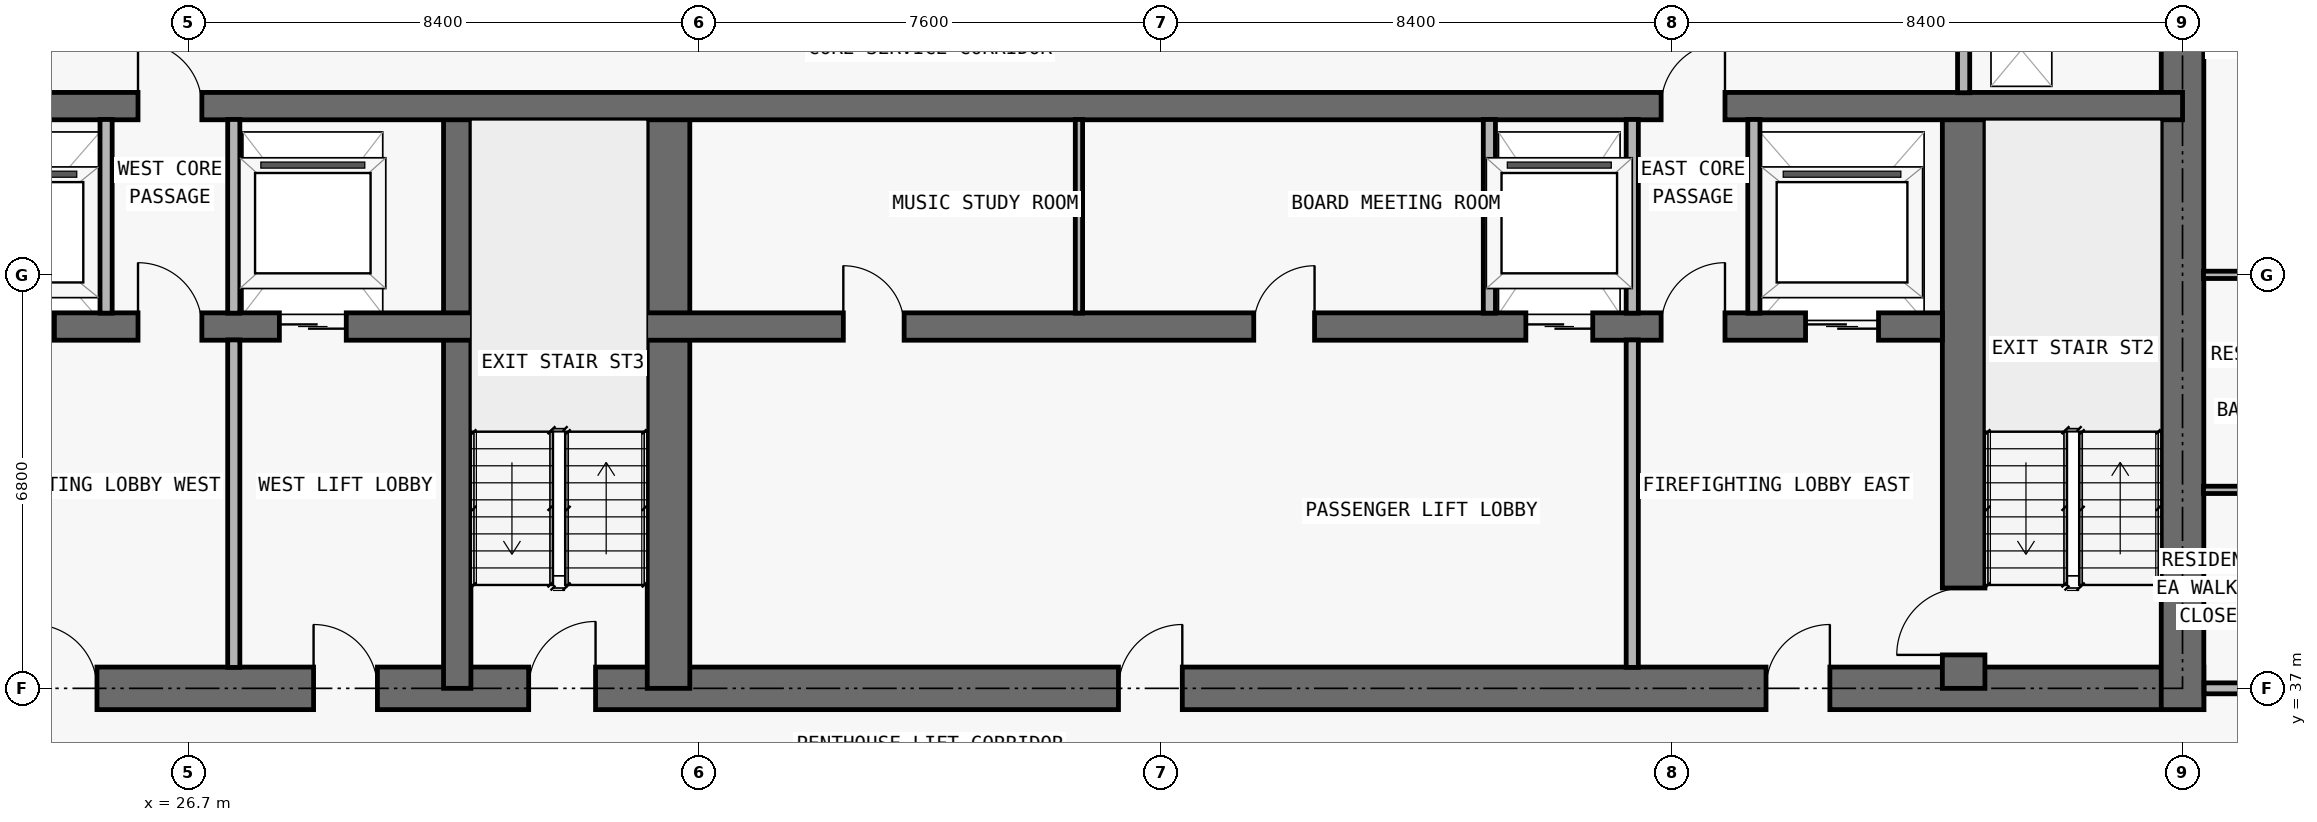
"""IFC4 building model, lengths in metres.
Left out: names, types, materials, properties, quantities, classifications, styles, units other than length and angle.
Written with IfcOpenShell. Run it as: python <this file> out.ifc"""

import sys

from ifc_helpers import new_model, si_unit, direction, frame, frame_2d, origin, place, context, subcontext, project, spatial, rectangle, extrude, element, fill, save


model = new_model("IFC4")
c1 = context("Model", 3, precision=1e-05, world=origin(), true_north=direction((0.0, 1.0)))
c2 = subcontext(c1, "Body", "Model", "MODEL_VIEW")
j1 = project(units=[si_unit("LENGTHUNIT", "METRE"), si_unit("PLANEANGLEUNIT", "RADIAN")], contexts=[c1])
p1 = place(None, origin())
s1 = spatial("IfcSite", under=j1, at=p1, CompositionType="ELEMENT")
p2 = place(p1, origin())
s2 = spatial("IfcBuilding", under=s1, at=p2, CompositionType="ELEMENT")
p3 = place(p2, frame((0.0, 0.0, 229.8)))
s3 = spatial("IfcBuildingStorey", under=s2, at=p3, CompositionType="ELEMENT", Elevation=229.8)
p4 = place(p3, frame((17.95, 37.0, 0.0), z_axis=(0.0, 0.0, 1.0), x_axis=(1.0, 0.0, 0.0)))
e1 = element("IfcWall", 1, at=p4, inside=s3, PredefinedType="SHEAR", context=c2, shape_type="SweptSolid", body=[
    extrude(rectangle(XDim=41.9, YDim=0.7, at=frame_2d((20.95, 0.0))), origin(), (0.0, 0.0, 1.0), 3.05),
])
p5 = place(p4, frame((14.35, 0.0, 0.0)))
e2 = element("IfcOpeningElement", 2, at=p5, cuts=e1, PredefinedType="OPENING", context=c2, shape_type="SweptSolid", body=[
    extrude(rectangle(XDim=1.1, YDim=2.15, at=frame_2d((0.55, 1.075))), frame((0.0, 0.36, 0.0), z_axis=(0.0, -1.0, 0.0), x_axis=(1.0, 0.0, 0.0)), (0.0, 0.0, 1.0), 0.72),
])
p6 = place(p4, frame((6.2, 0.0, 0.0)))
e3 = element("IfcOpeningElement", 3, at=p6, cuts=e1, PredefinedType="OPENING", context=c2, shape_type="SweptSolid", body=[
    extrude(rectangle(XDim=1.05, YDim=2.15, at=frame_2d((0.525, 1.075))), frame((0.0, 0.36, 0.0), z_axis=(0.0, -1.0, 0.0), x_axis=(1.0, 0.0, 0.0)), (0.0, 0.0, 1.0), 0.72),
])
p7 = place(p4, frame((34.7, 0.0, 0.0)))
e4 = element("IfcOpeningElement", 4, at=p7, cuts=e1, PredefinedType="OPENING", context=c2, shape_type="SweptSolid", body=[
    extrude(rectangle(XDim=1.05, YDim=2.15, at=frame_2d((0.525, 1.075))), frame((0.0, 0.36, 0.0), z_axis=(0.0, -1.0, 0.0), x_axis=(1.0, 0.0, 0.0)), (0.0, 0.0, 1.0), 0.72),
])
p8 = place(p4, frame((10.812, 0.0, 0.0)))
e5 = element("IfcOpeningElement", 5, at=p8, cuts=e1, PredefinedType="OPENING", context=c2, shape_type="SweptSolid", body=[
    extrude(rectangle(XDim=1.05, YDim=2.15, at=frame_2d((0.525, 1.075))), frame((0.0, 0.36, 0.0), z_axis=(0.0, -1.0, 0.0), x_axis=(1.0, 0.0, 0.0)), (0.0, 0.0, 1.0), 0.72),
])
p9 = place(p4, frame((24.05, 0.0, 0.0)))
e6 = element("IfcOpeningElement", 6, at=p9, cuts=e1, PredefinedType="OPENING", context=c2, shape_type="SweptSolid", body=[
    extrude(rectangle(XDim=1.05, YDim=2.15, at=frame_2d((0.525, 1.075))), frame((0.0, 0.36, 0.0), z_axis=(0.0, -1.0, 0.0), x_axis=(1.0, 0.0, 0.0)), (0.0, 0.0, 1.0), 0.72),
])
p10 = place(p3, frame((59.5, 36.65, 0.0), z_axis=(0.0, 0.0, 1.0), x_axis=(0.0, 1.0, 0.0)))
e7 = element("IfcWall", 7, at=p10, inside=s3, PredefinedType="SHEAR", context=c2, shape_type="SweptSolid", body=[
    extrude(rectangle(XDim=13.95, YDim=0.7, at=frame_2d((6.975, 0.0))), origin(), (0.0, 0.0, 1.0), 3.05),
])
p11 = place(p3, frame((55.9, 37.0, 0.0), z_axis=(0.0, 0.0, 1.0), x_axis=(0.0, 1.0, 0.0)))
e8 = element("IfcWall", 8, at=p11, inside=s3, PredefinedType="SHEAR", context=c2, shape_type="SweptSolid", body=[
    extrude(rectangle(XDim=9.575, YDim=0.7, at=frame_2d((4.788, 0.0))), origin(), (0.0, 0.0, 1.0), 3.05),
])
p12 = place(p11, frame((0.55, 0.0, 0.0)))
e9 = element("IfcOpeningElement", 9, at=p12, cuts=e8, PredefinedType="OPENING", context=c2, shape_type="SweptSolid", body=[
    extrude(rectangle(XDim=1.1, YDim=2.15, at=frame_2d((0.55, 1.075))), frame((0.0, 0.36, 0.0), z_axis=(0.0, -1.0, 0.0), x_axis=(1.0, 0.0, 0.0)), (0.0, 0.0, 1.0), 0.72),
])
p13 = place(p3, frame((31.125, 37.0, 0.0), z_axis=(0.0, 0.0, 1.0), x_axis=(0.0, 1.0, 0.0)))
e10 = element("IfcWall", 10, at=p13, inside=s3, PredefinedType="SHEAR", context=c2, shape_type="SweptSolid", body=[
    extrude(rectangle(XDim=9.575, YDim=0.45, at=frame_2d((4.788, 0.0))), origin(), (0.0, 0.0, 1.0), 3.05),
])
p14 = place(p3, frame((34.6, 37.0, 0.0), z_axis=(0.0, 0.0, 1.0), x_axis=(0.0, 1.0, 0.0)))
e11 = element("IfcWall", 11, at=p14, inside=s3, PredefinedType="SHEAR", context=c2, shape_type="SweptSolid", body=[
    extrude(rectangle(XDim=9.575, YDim=0.7, at=frame_2d((4.788, 0.0))), origin(), (0.0, 0.0, 1.0), 3.05),
])
p15 = place(p3, frame((22.25, 42.95, 0.0), z_axis=(0.0, 0.0, 1.0), x_axis=(1.0, 0.0, 0.0)))
e12 = element("IfcWall", 12, at=p15, inside=s3, PredefinedType="SHEAR", context=c2, shape_type="SweptSolid", body=[
    extrude(rectangle(XDim=33.3, YDim=0.45, at=frame_2d((16.65, 0.0))), origin(), (0.0, 0.0, 1.0), 3.05),
])
p16 = place(p15, frame((1.05, 0.0, 0.0)))
e13 = element("IfcOpeningElement", 13, at=p16, cuts=e12, PredefinedType="OPENING", context=c2, shape_type="SweptSolid", body=[
    extrude(rectangle(XDim=1.2, YDim=2.2, at=frame_2d((0.6, 1.1))), frame((0.0, 0.235, 0.0), z_axis=(0.0, -1.0, 0.0), x_axis=(1.0, 0.0, 0.0)), (0.0, 0.0, 1.0), 0.47),
])
p17 = place(p15, frame((31.05, 0.0, 0.0)))
e14 = element("IfcOpeningElement", 14, at=p17, cuts=e12, PredefinedType="OPENING", context=c2, shape_type="SweptSolid", body=[
    extrude(rectangle(XDim=1.2, YDim=2.2, at=frame_2d((0.6, 1.1))), frame((0.0, 0.235, 0.0), z_axis=(0.0, -1.0, 0.0), x_axis=(1.0, 0.0, 0.0)), (0.0, 0.0, 1.0), 0.47),
])
p18 = place(p15, frame((26.45, 0.0, 0.0)))
e15 = element("IfcOpeningElement", 15, at=p18, cuts=e12, PredefinedType="OPENING", context=c2, shape_type="SweptSolid", body=[
    extrude(rectangle(XDim=1.1, YDim=2.2, at=frame_2d((0.55, 1.1))), frame((0.0, 0.235, 0.0), z_axis=(0.0, -1.0, 0.0), x_axis=(1.0, 0.0, 0.0)), (0.0, 0.0, 1.0), 0.47),
])
p19 = place(p15, frame((5.95, 0.0, 0.0)))
e16 = element("IfcOpeningElement", 16, at=p19, cuts=e12, PredefinedType="OPENING", context=c2, shape_type="SweptSolid", body=[
    extrude(rectangle(XDim=1.1, YDim=2.2, at=frame_2d((0.55, 1.1))), frame((0.0, 0.235, 0.0), z_axis=(0.0, -1.0, 0.0), x_axis=(1.0, 0.0, 0.0)), (0.0, 0.0, 1.0), 0.47),
])
p20 = place(p15, frame((3.625, 0.0, 0.0)))
e17 = element("IfcOpeningElement", 17, at=p20, cuts=e12, PredefinedType="OPENING", context=c2, shape_type="SweptSolid", body=[
    extrude(rectangle(XDim=1.05, YDim=2.15, at=frame_2d((0.525, 1.075))), frame((0.0, 0.235, 0.0), z_axis=(0.0, -1.0, 0.0), x_axis=(1.0, 0.0, 0.0)), (0.0, 0.0, 1.0), 0.47),
])
p21 = place(p15, frame((28.675, 0.0, 0.0)))
e18 = element("IfcOpeningElement", 18, at=p21, cuts=e12, PredefinedType="OPENING", context=c2, shape_type="SweptSolid", body=[
    extrude(rectangle(XDim=1.05, YDim=2.15, at=frame_2d((0.525, 1.075))), frame((0.0, 0.235, 0.0), z_axis=(0.0, -1.0, 0.0), x_axis=(1.0, 0.0, 0.0)), (0.0, 0.0, 1.0), 0.47),
])
p22 = place(p15, frame((15.225, 0.0, 0.0)))
e19 = element("IfcOpeningElement", 19, at=p22, cuts=e12, PredefinedType="OPENING", context=c2, shape_type="SweptSolid", body=[
    extrude(rectangle(XDim=1.0, YDim=2.2, at=frame_2d((0.5, 1.1))), frame((0.0, 0.235, 0.0), z_axis=(0.0, -1.0, 0.0), x_axis=(1.0, 0.0, 0.0)), (0.0, 0.0, 1.0), 0.47),
])
p23 = place(p15, frame((21.975, 0.0, 0.0)))
e20 = element("IfcOpeningElement", 20, at=p23, cuts=e12, PredefinedType="OPENING", context=c2, shape_type="SweptSolid", body=[
    extrude(rectangle(XDim=1.0, YDim=2.2, at=frame_2d((0.5, 1.1))), frame((0.0, 0.235, 0.0), z_axis=(0.0, -1.0, 0.0), x_axis=(1.0, 0.0, 0.0)), (0.0, 0.0, 1.0), 0.47),
])
p24 = place(p3, frame((18.3, 46.575, 0.0), z_axis=(0.0, 0.0, 1.0), x_axis=(1.0, 0.0, 0.0)))
e21 = element("IfcWall", 21, at=p24, inside=s3, PredefinedType="SHEAR", context=c2, shape_type="SweptSolid", body=[
    extrude(rectangle(XDim=41.2, YDim=0.45, at=frame_2d((20.6, 0.0))), origin(), (0.0, 0.0, 1.0), 3.05),
])
p25 = place(p24, frame((7.575, 0.0, 0.0)))
e22 = element("IfcOpeningElement", 22, at=p25, cuts=e21, PredefinedType="OPENING", context=c2, shape_type="SweptSolid", body=[
    extrude(rectangle(XDim=1.05, YDim=2.15, at=frame_2d((0.525, 1.075))), frame((0.0, 0.235, 0.0), z_axis=(0.0, -1.0, 0.0), x_axis=(1.0, 0.0, 0.0)), (0.0, 0.0, 1.0), 0.47),
])
p26 = place(p24, frame((32.625, 0.0, 0.0)))
e23 = element("IfcOpeningElement", 23, at=p26, cuts=e21, PredefinedType="OPENING", context=c2, shape_type="SweptSolid", body=[
    extrude(rectangle(XDim=1.05, YDim=2.15, at=frame_2d((0.525, 1.075))), frame((0.0, 0.235, 0.0), z_axis=(0.0, -1.0, 0.0), x_axis=(1.0, 0.0, 0.0)), (0.0, 0.0, 1.0), 0.47),
])
p27 = place(p3, frame((25.35, 43.17, 0.0), z_axis=(0.0, 0.0, 1.0), x_axis=(0.0, 1.0, 0.0)))
e24 = element("IfcWall", 24, at=p27, inside=s3, PredefinedType="PARTITIONING", context=c2, shape_type="SweptSolid", body=[
    extrude(rectangle(XDim=3.185, YDim=0.2, at=frame_2d((1.593, 0.0))), origin(), (0.0, 0.0, 1.0), 3.05),
])
p28 = place(p3, frame((27.45, 37.345, 0.0), z_axis=(0.0, 0.0, 1.0), x_axis=(0.0, 1.0, 0.0)))
e25 = element("IfcWall", 25, at=p28, inside=s3, PredefinedType="PARTITIONING", context=c2, shape_type="SweptSolid", body=[
    extrude(rectangle(XDim=5.385, YDim=0.2, at=frame_2d((2.692, 0.0))), origin(), (0.0, 0.0, 1.0), 3.05),
])
p29 = place(p3, frame((27.45, 43.17, 0.0), z_axis=(0.0, 0.0, 1.0), x_axis=(0.0, 1.0, 0.0)))
e26 = element("IfcWall", 26, at=p29, inside=s3, PredefinedType="PARTITIONING", context=c2, shape_type="SweptSolid", body=[
    extrude(rectangle(XDim=3.185, YDim=0.2, at=frame_2d((1.593, 0.0))), origin(), (0.0, 0.0, 1.0), 3.05),
])
p30 = place(p3, frame((41.35, 43.17, 0.0), z_axis=(0.0, 0.0, 1.0), x_axis=(0.0, 1.0, 0.0)))
e27 = element("IfcWall", 27, at=p30, inside=s3, PredefinedType="PARTITIONING", context=c2, shape_type="SweptSolid", body=[
    extrude(rectangle(XDim=3.185, YDim=0.12, at=frame_2d((1.593, 0.0))), origin(), (0.0, 0.0, 1.0), 3.05),
])
p31 = place(p3, frame((48.1, 43.17, 0.0), z_axis=(0.0, 0.0, 1.0), x_axis=(0.0, 1.0, 0.0)))
e28 = element("IfcWall", 28, at=p31, inside=s3, PredefinedType="PARTITIONING", context=c2, shape_type="SweptSolid", body=[
    extrude(rectangle(XDim=3.185, YDim=0.2, at=frame_2d((1.593, 0.0))), origin(), (0.0, 0.0, 1.0), 3.05),
])
p32 = place(p3, frame((50.45, 37.345, 0.0), z_axis=(0.0, 0.0, 1.0), x_axis=(0.0, 1.0, 0.0)))
e29 = element("IfcWall", 29, at=p32, inside=s3, PredefinedType="PARTITIONING", context=c2, shape_type="SweptSolid", body=[
    extrude(rectangle(XDim=5.385, YDim=0.2, at=frame_2d((2.692, 0.0))), origin(), (0.0, 0.0, 1.0), 3.05),
])
for number, where, z_axis, x_axis in (
    (30, (50.45, 43.17, 0.0), (0.0, 0.0, 1.0), (0.0, 1.0, 0.0)),
    (31, (52.45, 43.17, 0.0), (0.0, 0.0, 1.0), (0.0, 1.0, 0.0)),
):
    element("IfcWall", number, at=place(p3, frame(where, z_axis=z_axis, x_axis=x_axis)), inside=s3, PredefinedType="PARTITIONING", context=c2, shape_type="SweptSolid", body=[
        extrude(rectangle(XDim=3.185, YDim=0.2, at=frame_2d((1.593, 0.0))), origin(), (0.0, 0.0, 1.0), 3.05),
    ])
p33 = place(p3, frame((55.9, 46.795, 0.0), z_axis=(0.0, 0.0, 1.0), x_axis=(0.0, 1.0, 0.0)))
e32 = element("IfcWall", 32, at=p33, inside=s3, PredefinedType="PARTITIONING", context=c2, shape_type="SweptSolid", body=[
    extrude(rectangle(XDim=3.16, YDim=0.2, at=frame_2d((1.58, 0.0))), origin(), (0.0, 0.0, 1.0), 3.05),
])
p34 = place(p3, frame((59.855, 37.0, 0.0), z_axis=(0.0, 0.0, 1.0), x_axis=(1.0, 0.0, 0.0)))
e33 = element("IfcWall", 33, at=p34, inside=s3, PredefinedType="PARTITIONING", context=c2, shape_type="SweptSolid", body=[
    extrude(rectangle(XDim=5.845, YDim=0.18, at=frame_2d((2.922, 0.0))), origin(), (0.0, 0.0, 1.0), 3.05),
])
p35 = place(p34, frame((3.57, 0.0, 0.0)))
e34 = element("IfcOpeningElement", 34, at=p35, cuts=e33, PredefinedType="OPENING", context=c2, shape_type="SweptSolid", body=[
    extrude(rectangle(XDim=1.0, YDim=2.2, at=frame_2d((0.5, 1.1))), frame((0.0, 0.1, 0.0), z_axis=(0.0, -1.0, 0.0), x_axis=(1.0, 0.0, 0.0)), (0.0, 0.0, 1.0), 0.2),
])
p36 = place(p3, frame((59.845, 40.264, 0.0), z_axis=(0.0, 0.0, 1.0), x_axis=(1.0, 0.0, 0.0)))
e35 = element("IfcWall", 35, at=p36, inside=s3, PredefinedType="PARTITIONING", context=c2, shape_type="SweptSolid", body=[
    extrude(rectangle(XDim=2.305, YDim=0.12, at=frame_2d((1.152, 0.0))), origin(), (0.0, 0.0, 1.0), 3.05),
])
p37 = place(p3, frame((59.845, 43.8, 0.0), z_axis=(0.0, 0.0, 1.0), x_axis=(1.0, 0.0, 0.0)))
e36 = element("IfcWall", 36, at=p37, inside=s3, PredefinedType="PARTITIONING", context=c2, shape_type="SweptSolid", body=[
    extrude(rectangle(XDim=9.56, YDim=0.12, at=frame_2d((4.78, 0.0))), origin(), (0.0, 0.0, 1.0), 2.418),
])
p38 = place(p37, frame((3.63, 0.0, 0.0)))
e37 = element("IfcOpeningElement", 37, at=p38, cuts=e36, PredefinedType="OPENING", context=c2, shape_type="SweptSolid", body=[
    extrude(rectangle(XDim=0.9, YDim=2.15, at=frame_2d((0.45, 1.075))), frame((0.0, 0.07, 0.0), z_axis=(0.0, -1.0, 0.0), x_axis=(1.0, 0.0, 0.0)), (0.0, 0.0, 1.0), 0.14),
])
p39 = place(p37, frame((0.728, 0.0, 0.0)))
e38 = element("IfcOpeningElement", 38, at=p39, cuts=e36, PredefinedType="OPENING", context=c2, shape_type="SweptSolid", body=[
    extrude(rectangle(XDim=0.85, YDim=2.1, at=frame_2d((0.425, 1.05))), frame((0.0, 0.07, 0.0), z_axis=(0.0, -1.0, 0.0), x_axis=(1.0, 0.0, 0.0)), (0.0, 0.0, 1.0), 0.14),
])
p40 = place(p16, origin())
e39 = element("IfcDoor", 39, at=p40, inside=s3, OperationType="DOUBLE_DOOR_SLIDING", PredefinedType="DOOR", context=c2, shape_type="SweptSolid", body=[
    extrude(rectangle(XDim=1.2, YDim=2.2, at=frame_2d((0.6, 1.1))), frame((0.0, 0.025, 0.0), z_axis=(0.0, -1.0, 0.0), x_axis=(1.0, 0.0, 0.0)), (0.0, 0.0, 1.0), 0.05),
])
fill(e13, e39)
p41 = place(p17, origin())
e40 = element("IfcDoor", 40, at=p41, inside=s3, OperationType="DOUBLE_DOOR_SLIDING", PredefinedType="DOOR", context=c2, shape_type="SweptSolid", body=[
    extrude(rectangle(XDim=1.2, YDim=2.2, at=frame_2d((0.6, 1.1))), frame((0.0, 0.025, 0.0), z_axis=(0.0, -1.0, 0.0), x_axis=(1.0, 0.0, 0.0)), (0.0, 0.0, 1.0), 0.05),
])
fill(e14, e40)
p42 = place(p18, origin())
e41 = element("IfcDoor", 41, at=p42, inside=s3, OperationType="DOUBLE_DOOR_SLIDING", PredefinedType="DOOR", context=c2, shape_type="SweptSolid", body=[
    extrude(rectangle(XDim=1.1, YDim=2.2, at=frame_2d((0.55, 1.1))), frame((0.0, 0.025, 0.0), z_axis=(0.0, -1.0, 0.0), x_axis=(1.0, 0.0, 0.0)), (0.0, 0.0, 1.0), 0.05),
])
fill(e15, e41)
p43 = place(p19, origin())
e42 = element("IfcDoor", 42, at=p43, inside=s3, OperationType="DOUBLE_DOOR_SLIDING", PredefinedType="DOOR", context=c2, shape_type="SweptSolid", body=[
    extrude(rectangle(XDim=1.1, YDim=2.2, at=frame_2d((0.55, 1.1))), frame((0.0, 0.025, 0.0), z_axis=(0.0, -1.0, 0.0), x_axis=(1.0, 0.0, 0.0)), (0.0, 0.0, 1.0), 0.05),
])
fill(e16, e42)
p44 = place(p5, origin())
e43 = element("IfcDoor", 43, at=p44, inside=s3, OperationType="SINGLE_SWING_RIGHT", PredefinedType="DOOR", context=c2, shape_type="SweptSolid", body=[
    extrude(rectangle(XDim=1.1, YDim=2.15, at=frame_2d((0.55, 1.075))), frame((0.0, 0.025, 0.0), z_axis=(0.0, -1.0, 0.0), x_axis=(1.0, 0.0, 0.0)), (0.0, 0.0, 1.0), 0.05),
])
fill(e2, e43)
p45 = place(p6, origin())
e44 = element("IfcDoor", 44, at=p45, inside=s3, OperationType="SINGLE_SWING_LEFT", PredefinedType="DOOR", context=c2, shape_type="SweptSolid", body=[
    extrude(rectangle(XDim=1.05, YDim=2.15, at=frame_2d((0.525, 1.075))), frame((0.0, 0.025, 0.0), z_axis=(0.0, -1.0, 0.0), x_axis=(1.0, 0.0, 0.0)), (0.0, 0.0, 1.0), 0.05),
])
fill(e3, e44)
p46 = place(p20, origin())
e45 = element("IfcDoor", 45, at=p46, inside=s3, OperationType="SINGLE_SWING_LEFT", PredefinedType="DOOR", context=c2, shape_type="SweptSolid", body=[
    extrude(rectangle(XDim=1.05, YDim=2.15, at=frame_2d((0.525, 1.075))), frame((0.0, 0.025, 0.0), z_axis=(0.0, -1.0, 0.0), x_axis=(1.0, 0.0, 0.0)), (0.0, 0.0, 1.0), 0.05),
])
fill(e17, e45)
p47 = place(p7, origin())
e46 = element("IfcDoor", 46, at=p47, inside=s3, OperationType="SINGLE_SWING_RIGHT", PredefinedType="DOOR", context=c2, shape_type="SweptSolid", body=[
    extrude(rectangle(XDim=1.05, YDim=2.15, at=frame_2d((0.525, 1.075))), frame((0.0, 0.025, 0.0), z_axis=(0.0, -1.0, 0.0), x_axis=(1.0, 0.0, 0.0)), (0.0, 0.0, 1.0), 0.05),
])
fill(e4, e46)
p48 = place(p12, origin())
e47 = element("IfcDoor", 47, at=p48, inside=s3, OperationType="SINGLE_SWING_LEFT", PredefinedType="DOOR", context=c2, shape_type="SweptSolid", body=[
    extrude(rectangle(XDim=1.1, YDim=2.15, at=frame_2d((0.55, 1.075))), frame((0.0, 0.025, 0.0), z_axis=(0.0, -1.0, 0.0), x_axis=(1.0, 0.0, 0.0)), (0.0, 0.0, 1.0), 0.05),
])
fill(e9, e47)
p49 = place(p21, origin())
e48 = element("IfcDoor", 48, at=p49, inside=s3, OperationType="SINGLE_SWING_RIGHT", PredefinedType="DOOR", context=c2, shape_type="SweptSolid", body=[
    extrude(rectangle(XDim=1.05, YDim=2.15, at=frame_2d((0.525, 1.075))), frame((0.0, 0.025, 0.0), z_axis=(0.0, -1.0, 0.0), x_axis=(1.0, 0.0, 0.0)), (0.0, 0.0, 1.0), 0.05),
])
fill(e18, e48)
p50 = place(p8, origin())
e49 = element("IfcDoor", 49, at=p50, inside=s3, OperationType="SINGLE_SWING_LEFT", PredefinedType="DOOR", context=c2, shape_type="SweptSolid", body=[
    extrude(rectangle(XDim=1.05, YDim=2.15, at=frame_2d((0.525, 1.075))), frame((0.0, 0.025, 0.0), z_axis=(0.0, -1.0, 0.0), x_axis=(1.0, 0.0, 0.0)), (0.0, 0.0, 1.0), 0.05),
])
fill(e5, e49)
p51 = place(p9, origin())
e50 = element("IfcDoor", 50, at=p51, inside=s3, OperationType="SINGLE_SWING_RIGHT", PredefinedType="DOOR", context=c2, shape_type="SweptSolid", body=[
    extrude(rectangle(XDim=1.05, YDim=2.15, at=frame_2d((0.525, 1.075))), frame((0.0, 0.025, 0.0), z_axis=(0.0, -1.0, 0.0), x_axis=(1.0, 0.0, 0.0)), (0.0, 0.0, 1.0), 0.05),
])
fill(e6, e50)
p52 = place(p22, origin())
e51 = element("IfcDoor", 51, at=p52, inside=s3, OperationType="SINGLE_SWING_LEFT", PredefinedType="DOOR", context=c2, shape_type="SweptSolid", body=[
    extrude(rectangle(XDim=1.0, YDim=2.2, at=frame_2d((0.5, 1.1))), frame((0.0, 0.025, 0.0), z_axis=(0.0, -1.0, 0.0), x_axis=(1.0, 0.0, 0.0)), (0.0, 0.0, 1.0), 0.05),
])
fill(e19, e51)
p53 = place(p23, origin())
e52 = element("IfcDoor", 52, at=p53, inside=s3, OperationType="SINGLE_SWING_RIGHT", PredefinedType="DOOR", context=c2, shape_type="SweptSolid", body=[
    extrude(rectangle(XDim=1.0, YDim=2.2, at=frame_2d((0.5, 1.1))), frame((0.0, 0.025, 0.0), z_axis=(0.0, -1.0, 0.0), x_axis=(1.0, 0.0, 0.0)), (0.0, 0.0, 1.0), 0.05),
])
fill(e20, e52)
p54 = place(p25, origin())
e53 = element("IfcDoor", 53, at=p54, inside=s3, OperationType="SINGLE_SWING_LEFT", PredefinedType="DOOR", context=c2, shape_type="SweptSolid", body=[
    extrude(rectangle(XDim=1.05, YDim=2.15, at=frame_2d((0.525, 1.075))), frame((0.0, 0.025, 0.0), z_axis=(0.0, -1.0, 0.0), x_axis=(1.0, 0.0, 0.0)), (0.0, 0.0, 1.0), 0.05),
])
fill(e22, e53)
p55 = place(p26, origin())
e54 = element("IfcDoor", 54, at=p55, inside=s3, OperationType="SINGLE_SWING_RIGHT", PredefinedType="DOOR", context=c2, shape_type="SweptSolid", body=[
    extrude(rectangle(XDim=1.05, YDim=2.15, at=frame_2d((0.525, 1.075))), frame((0.0, 0.025, 0.0), z_axis=(0.0, -1.0, 0.0), x_axis=(1.0, 0.0, 0.0)), (0.0, 0.0, 1.0), 0.05),
])
fill(e23, e54)
save(model, sys.argv[1])
